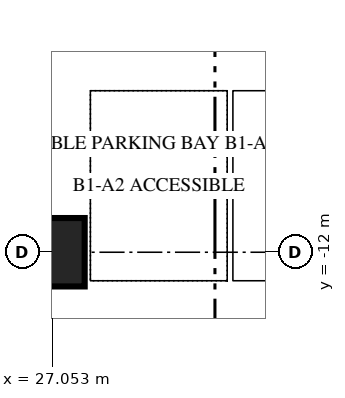
"""IFC4 building model, lengths in metres.
Left out: names, types, materials, properties, quantities, classifications, styles, units other than length and angle.
Written with IfcOpenShell. Run it as: python <this file> out.ifc"""

import sys

from ifc_helpers import new_model, si_unit, direction, frame, origin, origin_2d, place, context, subcontext, project, spatial, rectangle, extrude, element, save


model = new_model("IFC4")
c1 = context("Model", 3, precision=1e-05, world=origin(), true_north=direction((0.0, 1.0)))
c2 = subcontext(c1, "Body", "Model", "MODEL_VIEW")
j1 = project(units=[si_unit("LENGTHUNIT", "METRE"), si_unit("PLANEANGLEUNIT", "RADIAN")], contexts=[c1])
p1 = place(None, origin())
s1 = spatial("IfcSite", under=j1, at=p1, CompositionType="ELEMENT")
p2 = place(p1, origin())
s2 = spatial("IfcBuilding", under=s1, at=p2, CompositionType="ELEMENT")
p3 = place(p2, frame((0.0, 0.0, -5.0)))
s3 = spatial("IfcBuildingStorey", under=s2, at=p3, CompositionType="ELEMENT", Elevation=-5.0)
p4 = place(p3, frame((27.0, -12.0, 0.0), z_axis=(0.0, 0.0, 1.0), x_axis=(1.0, 0.0, 0.0)))
e1 = element("IfcColumn", 1, at=p4, inside=s3, PredefinedType="COLUMN", context=c2, shape_type="SweptSolid", body=[
    extrude(rectangle(XDim=1.8, YDim=1.8, at=origin_2d()), origin(), (0.0, 0.0, 1.0), 5.0),
])
save(model, sys.argv[1])
